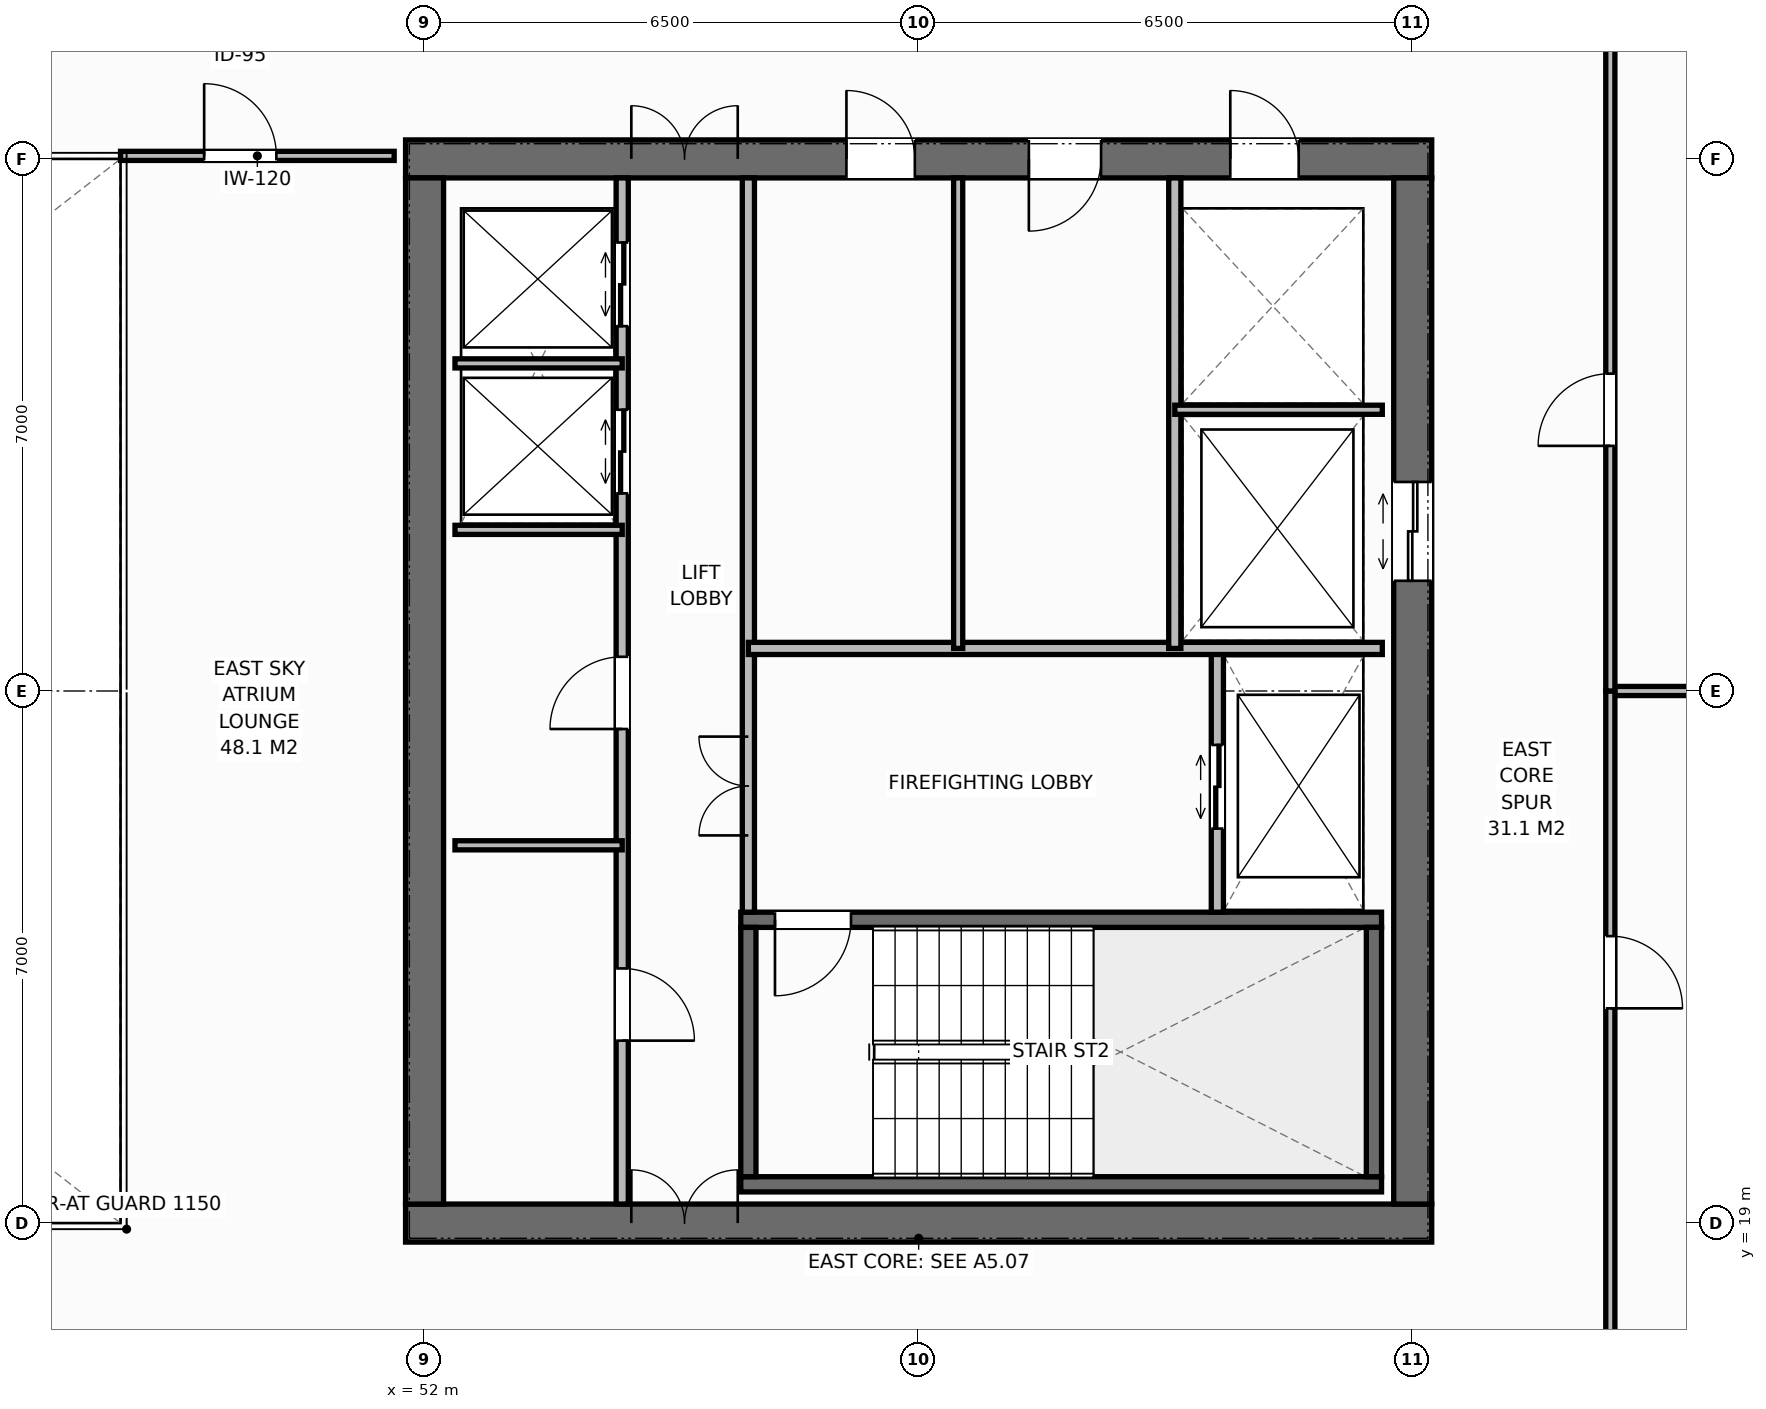
"""IFC4 building model, lengths in metres.
Left out: names, types, materials, properties, quantities, classifications, styles, units other than length and angle.
Written with IfcOpenShell. Run it as: python <this file> out.ifc"""

import sys

from ifc_helpers import new_model, si_unit, direction, frame, frame_2d, origin, place, context, subcontext, project, spatial, rectangle, extrude, element, fill, save


model = new_model("IFC4")
c1 = context("Model", 3, precision=1e-05, world=origin(), true_north=direction((0.0, 1.0)))
c2 = subcontext(c1, "Body", "Model", "MODEL_VIEW")
j1 = project(units=[si_unit("LENGTHUNIT", "METRE"), si_unit("PLANEANGLEUNIT", "RADIAN")], contexts=[c1])
p1 = place(None, origin())
s1 = spatial("IfcSite", under=j1, at=p1, CompositionType="ELEMENT")
p2 = place(p1, origin())
s2 = spatial("IfcBuilding", under=s1, at=p2, CompositionType="ELEMENT")
p3 = place(p2, frame((0.0, 0.0, 202.4)))
s3 = spatial("IfcBuildingStorey", under=s2, at=p3, CompositionType="ELEMENT", Elevation=202.4)
p4 = place(p3, frame((51.75, 19.0, 0.0), z_axis=(0.0, 0.0, 1.0), x_axis=(1.0, 0.0, 0.0)))
e1 = element("IfcWall", 1, at=p4, inside=s3, PredefinedType="SHEAR", context=c2, shape_type="SweptSolid", body=[
    extrude(rectangle(XDim=13.5, YDim=0.5, at=frame_2d((6.75, 0.0))), origin(), (0.0, 0.0, 1.0), 3.8),
])
p5 = place(p4, frame((2.97, 0.0, 0.0)))
e2 = element("IfcOpeningElement", 2, at=p5, cuts=e1, PredefinedType="OPENING", context=c2, shape_type="SweptSolid", body=[
    extrude(rectangle(XDim=1.4, YDim=2.2, at=frame_2d((0.7, 1.1))), frame((0.0, 0.26, 0.0), z_axis=(0.0, -1.0, 0.0), x_axis=(1.0, 0.0, 0.0)), (0.0, 0.0, 1.0), 0.52),
])
p6 = place(p3, frame((51.75, 33.0, 0.0), z_axis=(0.0, 0.0, 1.0), x_axis=(1.0, 0.0, 0.0)))
e3 = element("IfcWall", 3, at=p6, inside=s3, PredefinedType="SHEAR", context=c2, shape_type="SweptSolid", body=[
    extrude(rectangle(XDim=13.5, YDim=0.5, at=frame_2d((6.75, 0.0))), origin(), (0.0, 0.0, 1.0), 3.8),
])
p7 = place(p6, frame((2.97, 0.0, 0.0)))
e4 = element("IfcOpeningElement", 4, at=p7, cuts=e3, PredefinedType="OPENING", context=c2, shape_type="SweptSolid", body=[
    extrude(rectangle(XDim=1.4, YDim=2.2, at=frame_2d((0.7, 1.1))), frame((0.0, 0.26, 0.0), z_axis=(0.0, -1.0, 0.0), x_axis=(1.0, 0.0, 0.0)), (0.0, 0.0, 1.0), 0.52),
])
p8 = place(p6, frame((10.85, 0.0, 0.0)))
e5 = element("IfcOpeningElement", 5, at=p8, cuts=e3, PredefinedType="OPENING", context=c2, shape_type="SweptSolid", body=[
    extrude(rectangle(XDim=0.9, YDim=2.15, at=frame_2d((0.45, 1.075))), frame((0.0, 0.26, 0.0), z_axis=(0.0, -1.0, 0.0), x_axis=(1.0, 0.0, 0.0)), (0.0, 0.0, 1.0), 0.52),
])
p9 = place(p6, frame((5.8, 0.0, 0.0)))
e6 = element("IfcOpeningElement", 6, at=p9, cuts=e3, PredefinedType="OPENING", context=c2, shape_type="SweptSolid", body=[
    extrude(rectangle(XDim=0.9, YDim=2.15, at=frame_2d((0.45, 1.075))), frame((0.0, 0.26, 0.0), z_axis=(0.0, -1.0, 0.0), x_axis=(1.0, 0.0, 0.0)), (0.0, 0.0, 1.0), 0.52),
])
p10 = place(p6, frame((8.2, 0.0, 0.0)))
e7 = element("IfcOpeningElement", 7, at=p10, cuts=e3, PredefinedType="OPENING", context=c2, shape_type="SweptSolid", body=[
    extrude(rectangle(XDim=0.95, YDim=2.15, at=frame_2d((0.475, 1.075))), frame((0.0, 0.26, 0.0), z_axis=(0.0, -1.0, 0.0), x_axis=(1.0, 0.0, 0.0)), (0.0, 0.0, 1.0), 0.52),
])
p11 = place(p3, frame((52.0, 19.25, 0.0), z_axis=(0.0, 0.0, 1.0), x_axis=(0.0, 1.0, 0.0)))
e8 = element("IfcWall", 8, at=p11, inside=s3, PredefinedType="SHEAR", context=c2, shape_type="SweptSolid", body=[
    extrude(rectangle(XDim=13.5, YDim=0.5, at=frame_2d((6.75, 0.0))), origin(), (0.0, 0.0, 1.0), 3.8),
])
p12 = place(p3, frame((65.0, 19.25, 0.0), z_axis=(0.0, 0.0, 1.0), x_axis=(0.0, 1.0, 0.0)))
e9 = element("IfcWall", 9, at=p12, inside=s3, PredefinedType="SHEAR", context=c2, shape_type="SweptSolid", body=[
    extrude(rectangle(XDim=13.5, YDim=0.5, at=frame_2d((6.75, 0.0))), origin(), (0.0, 0.0, 1.0), 3.8),
])
p13 = place(p12, frame((8.2, 0.0, 0.0)))
e10 = element("IfcOpeningElement", 10, at=p13, cuts=e9, PredefinedType="OPENING", context=c2, shape_type="SweptSolid", body=[
    extrude(rectangle(XDim=1.3, YDim=2.2, at=frame_2d((0.65, 1.1))), frame((0.0, 0.26, 0.0), z_axis=(0.0, -1.0, 0.0), x_axis=(1.0, 0.0, 0.0)), (0.0, 0.0, 1.0), 0.52),
])
p14 = place(p3, frame((56.16, 19.51, 0.0), z_axis=(0.0, 0.0, 1.0), x_axis=(1.0, 0.0, 0.0)))
e11 = element("IfcWall", 11, at=p14, inside=s3, PredefinedType="SHEAR", context=c2, shape_type="SweptSolid", body=[
    extrude(rectangle(XDim=8.43, YDim=0.2, at=frame_2d((4.215, 0.0))), origin(), (0.0, 0.0, 1.0), 3.8),
])
p15 = place(p3, frame((56.16, 22.99, 0.0), z_axis=(0.0, 0.0, 1.0), x_axis=(1.0, 0.0, 0.0)))
e12 = element("IfcWall", 12, at=p15, inside=s3, PredefinedType="SHEAR", context=c2, shape_type="SweptSolid", body=[
    extrude(rectangle(XDim=8.43, YDim=0.2, at=frame_2d((4.215, 0.0))), origin(), (0.0, 0.0, 1.0), 3.8),
])
p16 = place(p15, frame((0.45, 0.0, 0.0)))
e13 = element("IfcOpeningElement", 13, at=p16, cuts=e12, PredefinedType="OPENING", context=c2, shape_type="SweptSolid", body=[
    extrude(rectangle(XDim=1.0, YDim=2.15, at=frame_2d((0.5, 1.075))), frame((0.0, 0.11, 0.0), z_axis=(0.0, -1.0, 0.0), x_axis=(1.0, 0.0, 0.0)), (0.0, 0.0, 1.0), 0.22),
])
for number, where, z_axis, x_axis in (
    (14, (56.26, 19.61, 0.0), (0.0, 0.0, 1.0), (0.0, 1.0, 0.0)),
    (15, (64.49, 19.61, 0.0), (0.0, 0.0, 1.0), (0.0, 1.0, 0.0)),
):
    element("IfcWall", number, at=place(p3, frame(where, z_axis=z_axis, x_axis=x_axis)), inside=s3, PredefinedType="SHEAR", context=c2, shape_type="SweptSolid", body=[
        extrude(rectangle(XDim=3.28, YDim=0.2, at=frame_2d((1.64, 0.0))), origin(), (0.0, 0.0, 1.0), 3.8),
    ])
p17 = place(p3, frame((54.6, 19.25, 0.0), z_axis=(0.0, 0.0, 1.0), x_axis=(0.0, 1.0, 0.0)))
e16 = element("IfcWall", 16, at=p17, inside=s3, PredefinedType="STANDARD", context=c2, shape_type="SweptSolid", body=[
    extrude(rectangle(XDim=13.5, YDim=0.16, at=frame_2d((6.75, 0.0))), origin(), (0.0, 0.0, 1.0), 3.58),
])
p18 = place(p17, frame((2.15, 0.0, 0.0)))
e17 = element("IfcOpeningElement", 17, at=p18, cuts=e16, PredefinedType="OPENING", context=c2, shape_type="SweptSolid", body=[
    extrude(rectangle(XDim=0.95, YDim=2.15, at=frame_2d((0.475, 1.075))), frame((0.0, 0.09, 0.0), z_axis=(0.0, -1.0, 0.0), x_axis=(1.0, 0.0, 0.0)), (0.0, 0.0, 1.0), 0.18),
])
p19 = place(p17, frame((6.25, 0.0, 0.0)))
e18 = element("IfcOpeningElement", 18, at=p19, cuts=e16, PredefinedType="OPENING", context=c2, shape_type="SweptSolid", body=[
    extrude(rectangle(XDim=0.95, YDim=2.15, at=frame_2d((0.475, 1.075))), frame((0.0, 0.09, 0.0), z_axis=(0.0, -1.0, 0.0), x_axis=(1.0, 0.0, 0.0)), (0.0, 0.0, 1.0), 0.18),
])
p20 = place(p17, frame((9.35, 0.0, 0.0)))
e19 = element("IfcOpeningElement", 19, at=p20, cuts=e16, PredefinedType="OPENING", context=c2, shape_type="SweptSolid", body=[
    extrude(rectangle(XDim=1.1, YDim=2.2, at=frame_2d((0.55, 1.1))), frame((0.0, 0.09, 0.0), z_axis=(0.0, -1.0, 0.0), x_axis=(1.0, 0.0, 0.0)), (0.0, 0.0, 1.0), 0.18),
])
p21 = place(p17, frame((11.55, 0.0, 0.0)))
e20 = element("IfcOpeningElement", 20, at=p21, cuts=e16, PredefinedType="OPENING", context=c2, shape_type="SweptSolid", body=[
    extrude(rectangle(XDim=1.1, YDim=2.2, at=frame_2d((0.55, 1.1))), frame((0.0, 0.09, 0.0), z_axis=(0.0, -1.0, 0.0), x_axis=(1.0, 0.0, 0.0)), (0.0, 0.0, 1.0), 0.18),
])
p22 = place(p3, frame((56.26, 23.09, 0.0), z_axis=(0.0, 0.0, 1.0), x_axis=(0.0, 1.0, 0.0)))
e21 = element("IfcWall", 21, at=p22, inside=s3, PredefinedType="STANDARD", context=c2, shape_type="SweptSolid", body=[
    extrude(rectangle(XDim=9.66, YDim=0.16, at=frame_2d((4.83, 0.0))), origin(), (0.0, 0.0, 1.0), 3.58),
])
p23 = place(p22, frame((1.01, 0.0, 0.0)))
e22 = element("IfcOpeningElement", 22, at=p23, cuts=e21, PredefinedType="OPENING", context=c2, shape_type="SweptSolid", body=[
    extrude(rectangle(XDim=1.3, YDim=2.2, at=frame_2d((0.65, 1.1))), frame((0.0, 0.09, 0.0), z_axis=(0.0, -1.0, 0.0), x_axis=(1.0, 0.0, 0.0)), (0.0, 0.0, 1.0), 0.18),
])
for number, where, z_axis, x_axis in (
    (23, (52.4, 23.97, 0.0), (0.0, 0.0, 1.0), (1.0, 0.0, 0.0)),
    (24, (52.4, 28.12, 0.0), (0.0, 0.0, 1.0), (1.0, 0.0, 0.0)),
    (25, (52.4, 30.31, 0.0), (0.0, 0.0, 1.0), (1.0, 0.0, 0.0)),
):
    element("IfcWall", number, at=place(p3, frame(where, z_axis=z_axis, x_axis=x_axis)), inside=s3, PredefinedType="PARTITIONING", context=c2, shape_type="SweptSolid", body=[
        extrude(rectangle(XDim=2.2, YDim=0.12, at=frame_2d((1.1, 0.0))), origin(), (0.0, 0.0, 1.0), 3.58),
    ])
p24 = place(p3, frame((62.43, 23.09, 0.0), z_axis=(0.0, 0.0, 1.0), x_axis=(0.0, 1.0, 0.0)))
e26 = element("IfcWall", 26, at=p24, inside=s3, PredefinedType="STANDARD", context=c2, shape_type="SweptSolid", body=[
    extrude(rectangle(XDim=3.47, YDim=0.16, at=frame_2d((1.735, 0.0))), origin(), (0.0, 0.0, 1.0), 3.58),
])
p25 = place(p24, frame((1.1, 0.0, 0.0)))
e27 = element("IfcOpeningElement", 27, at=p25, cuts=e26, PredefinedType="OPENING", context=c2, shape_type="SweptSolid", body=[
    extrude(rectangle(XDim=1.1, YDim=2.2, at=frame_2d((0.55, 1.1))), frame((0.0, 0.09, 0.0), z_axis=(0.0, -1.0, 0.0), x_axis=(1.0, 0.0, 0.0)), (0.0, 0.0, 1.0), 0.18),
])
p26 = place(p3, frame((56.26, 26.56, 0.0), z_axis=(0.0, 0.0, 1.0), x_axis=(1.0, 0.0, 0.0)))
e28 = element("IfcWall", 28, at=p26, inside=s3, PredefinedType="STANDARD", context=c2, shape_type="SweptSolid", body=[
    extrude(rectangle(XDim=8.34, YDim=0.16, at=frame_2d((4.17, 0.0))), origin(), (0.0, 0.0, 1.0), 3.58),
])
p27 = place(p3, frame((61.87, 26.56, 0.0), z_axis=(0.0, 0.0, 1.0), x_axis=(0.0, 1.0, 0.0)))
e29 = element("IfcWall", 29, at=p27, inside=s3, PredefinedType="STANDARD", context=c2, shape_type="SweptSolid", body=[
    extrude(rectangle(XDim=6.19, YDim=0.16, at=frame_2d((3.095, 0.0))), origin(), (0.0, 0.0, 1.0), 3.58),
])
p28 = place(p3, frame((61.87, 29.7, 0.0), z_axis=(0.0, 0.0, 1.0), x_axis=(1.0, 0.0, 0.0)))
e30 = element("IfcWall", 30, at=p28, inside=s3, PredefinedType="PARTITIONING", context=c2, shape_type="SweptSolid", body=[
    extrude(rectangle(XDim=2.73, YDim=0.12, at=frame_2d((1.365, 0.0))), origin(), (0.0, 0.0, 1.0), 3.58),
])
p29 = place(p3, frame((59.02, 26.56, 0.0), z_axis=(0.0, 0.0, 1.0), x_axis=(0.0, 1.0, 0.0)))
e31 = element("IfcWall", 31, at=p29, inside=s3, PredefinedType="PARTITIONING", context=c2, shape_type="SweptSolid", body=[
    extrude(rectangle(XDim=6.19, YDim=0.12, at=frame_2d((3.095, 0.0))), origin(), (0.0, 0.0, 1.0), 3.58),
])
p30 = place(p3, frame((48.0, 33.04, 0.0), z_axis=(0.0, 0.0, 1.0), x_axis=(1.0, 0.0, 0.0)))
e32 = element("IfcWall", 32, at=p30, inside=s3, PredefinedType="PARTITIONING", context=c2, shape_type="SweptSolid", body=[
    extrude(rectangle(XDim=3.6, YDim=0.12, at=frame_2d((1.8, 0.0))), origin(), (0.0, 0.0, 1.0), 3.32),
])
p31 = place(p30, frame((1.1, 0.0, 0.0)))
e33 = element("IfcOpeningElement", 33, at=p31, cuts=e32, PredefinedType="OPENING", context=c2, shape_type="SweptSolid", body=[
    extrude(rectangle(XDim=0.95, YDim=2.15, at=frame_2d((0.475, 1.075))), frame((0.0, 0.07, 0.0), z_axis=(0.0, -1.0, 0.0), x_axis=(1.0, 0.0, 0.0)), (0.0, 0.0, 1.0), 0.14),
])
p32 = place(p3, frame((67.6, 26.0, 0.0), z_axis=(0.0, 0.0, 1.0), x_axis=(1.0, 0.0, 0.0)))
e34 = element("IfcWall", 34, at=p32, inside=s3, PredefinedType="PARTITIONING", context=c2, shape_type="SweptSolid", body=[
    extrude(rectangle(XDim=4.58, YDim=0.12, at=frame_2d((2.29, 0.0))), origin(), (0.0, 0.0, 1.0), 3.58),
])
p33 = place(p3, frame((67.6, 16.5, 0.0), z_axis=(0.0, 0.0, 1.0), x_axis=(0.0, 1.0, 0.0)))
e35 = element("IfcWall", 35, at=p33, inside=s3, PredefinedType="PARTITIONING", context=c2, shape_type="SweptSolid", body=[
    extrude(rectangle(XDim=9.5, YDim=0.12, at=frame_2d((4.75, 0.0))), origin(), (0.0, 0.0, 1.0), 3.58),
])
p34 = place(p33, frame((5.325, 0.0, 0.0)))
e36 = element("IfcOpeningElement", 36, at=p34, cuts=e35, PredefinedType="OPENING", context=c2, shape_type="SweptSolid", body=[
    extrude(rectangle(XDim=0.95, YDim=2.15, at=frame_2d((0.475, 1.075))), frame((0.0, 0.07, 0.0), z_axis=(0.0, -1.0, 0.0), x_axis=(1.0, 0.0, 0.0)), (0.0, 0.0, 1.0), 0.14),
])
p35 = place(p3, frame((67.6, 26.0, 0.0), z_axis=(0.0, 0.0, 1.0), x_axis=(0.0, 1.0, 0.0)))
e37 = element("IfcWall", 37, at=p35, inside=s3, PredefinedType="PARTITIONING", context=c2, shape_type="SweptSolid", body=[
    extrude(rectangle(XDim=9.5, YDim=0.12, at=frame_2d((4.75, 0.0))), origin(), (0.0, 0.0, 1.0), 3.58),
])
p36 = place(p35, frame((3.225, 0.0, 0.0)))
e38 = element("IfcOpeningElement", 38, at=p36, cuts=e37, PredefinedType="OPENING", context=c2, shape_type="SweptSolid", body=[
    extrude(rectangle(XDim=0.95, YDim=2.15, at=frame_2d((0.475, 1.075))), frame((0.0, 0.07, 0.0), z_axis=(0.0, -1.0, 0.0), x_axis=(1.0, 0.0, 0.0)), (0.0, 0.0, 1.0), 0.14),
])
p37 = place(p5, origin())
e39 = element("IfcDoor", 39, at=p37, inside=s3, OperationType="DOUBLE_DOOR_SINGLE_SWING", PredefinedType="DOOR", context=c2, shape_type="SweptSolid", body=[
    extrude(rectangle(XDim=1.4, YDim=2.2, at=frame_2d((0.7, 1.1))), frame((0.0, 0.075, 0.0), z_axis=(0.0, -1.0, 0.0), x_axis=(1.0, 0.0, 0.0)), (0.0, 0.0, 1.0), 0.05),
])
fill(e2, e39)
p38 = place(p7, origin())
e40 = element("IfcDoor", 40, at=p38, inside=s3, OperationType="DOUBLE_DOOR_SINGLE_SWING", PredefinedType="DOOR", context=c2, shape_type="SweptSolid", body=[
    extrude(rectangle(XDim=1.4, YDim=2.2, at=frame_2d((0.7, 1.1))), frame((0.0, -0.025, 0.0), z_axis=(0.0, -1.0, 0.0), x_axis=(1.0, 0.0, 0.0)), (0.0, 0.0, 1.0), 0.05),
])
fill(e4, e40)
p39 = place(p18, origin())
e41 = element("IfcDoor", 41, at=p39, inside=s3, OperationType="SINGLE_SWING_RIGHT", PredefinedType="DOOR", context=c2, shape_type="SweptSolid", body=[
    extrude(rectangle(XDim=0.95, YDim=2.15, at=frame_2d((0.475, 1.075))), frame((0.0, 0.025, 0.0), z_axis=(0.0, -1.0, 0.0), x_axis=(1.0, 0.0, 0.0)), (0.0, 0.0, 1.0), 0.05),
])
fill(e17, e41)
p40 = place(p19, origin())
e42 = element("IfcDoor", 42, at=p40, inside=s3, OperationType="SINGLE_SWING_LEFT", PredefinedType="DOOR", context=c2, shape_type="SweptSolid", body=[
    extrude(rectangle(XDim=0.95, YDim=2.15, at=frame_2d((0.475, 1.075))), frame((0.0, 0.025, 0.0), z_axis=(0.0, -1.0, 0.0), x_axis=(1.0, 0.0, 0.0)), (0.0, 0.0, 1.0), 0.05),
])
fill(e18, e42)
p41 = place(p20, origin())
e43 = element("IfcDoor", 43, at=p41, inside=s3, OperationType="DOUBLE_DOOR_SLIDING", PredefinedType="DOOR", context=c2, shape_type="SweptSolid", body=[
    extrude(rectangle(XDim=1.1, YDim=2.2, at=frame_2d((0.55, 1.1))), frame((0.0, 0.025, 0.0), z_axis=(0.0, -1.0, 0.0), x_axis=(1.0, 0.0, 0.0)), (0.0, 0.0, 1.0), 0.05),
])
fill(e19, e43)
p42 = place(p21, origin())
e44 = element("IfcDoor", 44, at=p42, inside=s3, OperationType="DOUBLE_DOOR_SLIDING", PredefinedType="DOOR", context=c2, shape_type="SweptSolid", body=[
    extrude(rectangle(XDim=1.1, YDim=2.2, at=frame_2d((0.55, 1.1))), frame((0.0, 0.025, 0.0), z_axis=(0.0, -1.0, 0.0), x_axis=(1.0, 0.0, 0.0)), (0.0, 0.0, 1.0), 0.05),
])
fill(e20, e44)
p43 = place(p16, origin())
e45 = element("IfcDoor", 45, at=p43, inside=s3, OperationType="SINGLE_SWING_RIGHT", PredefinedType="DOOR", context=c2, shape_type="SweptSolid", body=[
    extrude(rectangle(XDim=1.0, YDim=2.15, at=frame_2d((0.5, 1.075))), frame((0.0, 0.025, 0.0), z_axis=(0.0, -1.0, 0.0), x_axis=(1.0, 0.0, 0.0)), (0.0, 0.0, 1.0), 0.05),
])
fill(e13, e45)
p44 = place(p25, origin())
e46 = element("IfcDoor", 46, at=p44, inside=s3, OperationType="DOUBLE_DOOR_SLIDING", PredefinedType="DOOR", context=c2, shape_type="SweptSolid", body=[
    extrude(rectangle(XDim=1.1, YDim=2.2, at=frame_2d((0.55, 1.1))), frame((0.0, 0.025, 0.0), z_axis=(0.0, -1.0, 0.0), x_axis=(1.0, 0.0, 0.0)), (0.0, 0.0, 1.0), 0.05),
])
fill(e27, e46)
p45 = place(p23, origin())
e47 = element("IfcDoor", 47, at=p45, inside=s3, OperationType="DOUBLE_DOOR_SINGLE_SWING", PredefinedType="DOOR", context=c2, shape_type="SweptSolid", body=[
    extrude(rectangle(XDim=1.3, YDim=2.2, at=frame_2d((0.65, 1.1))), frame((0.0, 0.025, 0.0), z_axis=(0.0, -1.0, 0.0), x_axis=(1.0, 0.0, 0.0)), (0.0, 0.0, 1.0), 0.05),
])
fill(e22, e47)
p46 = place(p13, origin())
e48 = element("IfcDoor", 48, at=p46, inside=s3, OperationType="DOUBLE_DOOR_SLIDING", PredefinedType="DOOR", context=c2, shape_type="SweptSolid", body=[
    extrude(rectangle(XDim=1.3, YDim=2.2, at=frame_2d((0.65, 1.1))), frame((0.0, 0.025, 0.0), z_axis=(0.0, -1.0, 0.0), x_axis=(1.0, 0.0, 0.0)), (0.0, 0.0, 1.0), 0.05),
])
fill(e10, e48)
p47 = place(p8, origin())
e49 = element("IfcDoor", 49, at=p47, inside=s3, OperationType="SINGLE_SWING_LEFT", PredefinedType="DOOR", context=c2, shape_type="SweptSolid", body=[
    extrude(rectangle(XDim=0.9, YDim=2.15, at=frame_2d((0.45, 1.075))), frame((0.0, -0.025, 0.0), z_axis=(0.0, -1.0, 0.0), x_axis=(1.0, 0.0, 0.0)), (0.0, 0.0, 1.0), 0.05),
])
fill(e5, e49)
p48 = place(p9, origin())
e50 = element("IfcDoor", 50, at=p48, inside=s3, OperationType="SINGLE_SWING_LEFT", PredefinedType="DOOR", context=c2, shape_type="SweptSolid", body=[
    extrude(rectangle(XDim=0.9, YDim=2.15, at=frame_2d((0.45, 1.075))), frame((0.0, -0.025, 0.0), z_axis=(0.0, -1.0, 0.0), x_axis=(1.0, 0.0, 0.0)), (0.0, 0.0, 1.0), 0.05),
])
fill(e6, e50)
p49 = place(p10, origin())
e51 = element("IfcDoor", 51, at=p49, inside=s3, OperationType="SINGLE_SWING_RIGHT", PredefinedType="DOOR", context=c2, shape_type="SweptSolid", body=[
    extrude(rectangle(XDim=0.95, YDim=2.15, at=frame_2d((0.475, 1.075))), frame((0.0, -0.025, 0.0), z_axis=(0.0, -1.0, 0.0), x_axis=(1.0, 0.0, 0.0)), (0.0, 0.0, 1.0), 0.05),
])
fill(e7, e51)
p50 = place(p31, origin())
e52 = element("IfcDoor", 52, at=p50, inside=s3, OperationType="SINGLE_SWING_LEFT", PredefinedType="DOOR", context=c2, shape_type="SweptSolid", body=[
    extrude(rectangle(XDim=0.95, YDim=2.15, at=frame_2d((0.475, 1.075))), frame((0.0, 0.025, 0.0), z_axis=(0.0, -1.0, 0.0), x_axis=(1.0, 0.0, 0.0)), (0.0, 0.0, 1.0), 0.05),
])
fill(e33, e52)
p51 = place(p34, origin())
e53 = element("IfcDoor", 53, at=p51, inside=s3, OperationType="SINGLE_SWING_RIGHT", PredefinedType="DOOR", context=c2, shape_type="SweptSolid", body=[
    extrude(rectangle(XDim=0.95, YDim=2.15, at=frame_2d((0.475, 1.075))), frame((0.0, 0.025, 0.0), z_axis=(0.0, -1.0, 0.0), x_axis=(1.0, 0.0, 0.0)), (0.0, 0.0, 1.0), 0.05),
])
fill(e36, e53)
p52 = place(p36, origin())
e54 = element("IfcDoor", 54, at=p52, inside=s3, OperationType="SINGLE_SWING_LEFT", PredefinedType="DOOR", context=c2, shape_type="SweptSolid", body=[
    extrude(rectangle(XDim=0.95, YDim=2.15, at=frame_2d((0.475, 1.075))), frame((0.0, 0.025, 0.0), z_axis=(0.0, -1.0, 0.0), x_axis=(1.0, 0.0, 0.0)), (0.0, 0.0, 1.0), 0.05),
])
fill(e38, e54)
save(model, sys.argv[1])
